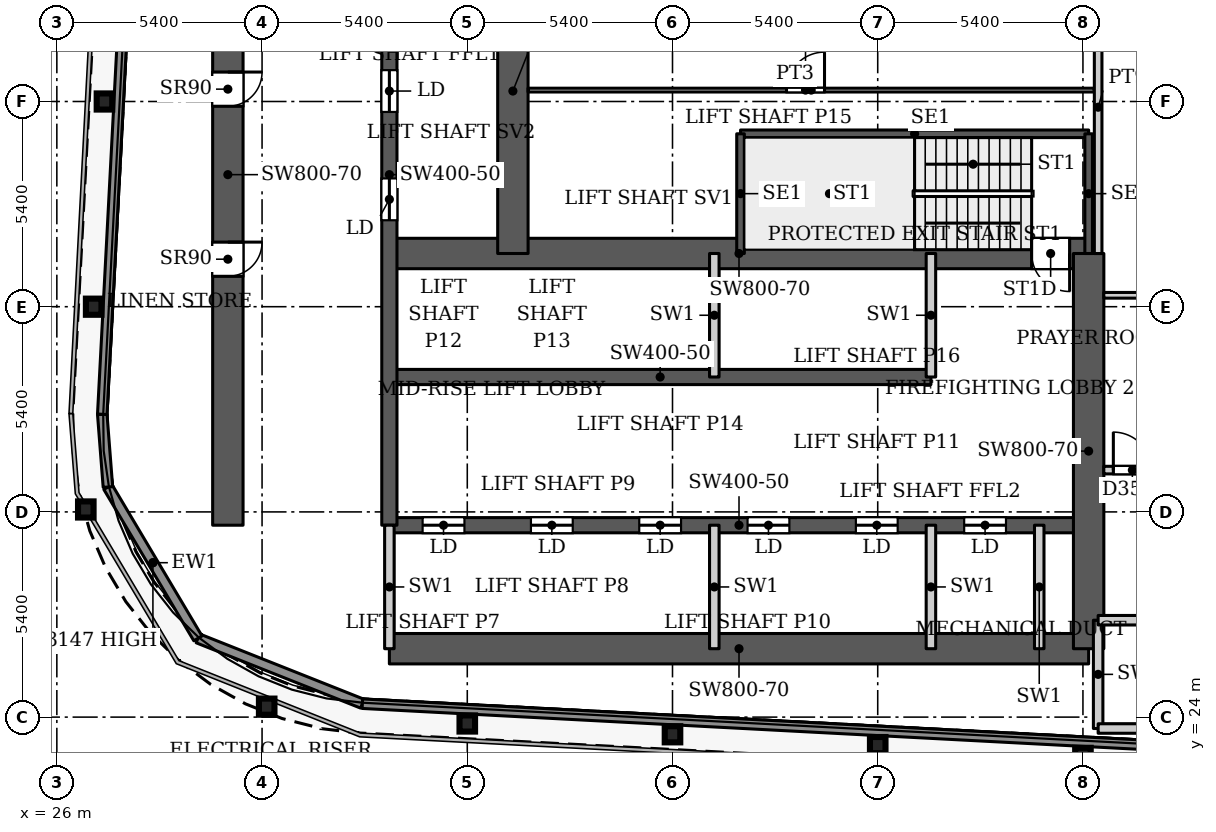
"""IFC4 building model, lengths in metres.
Left out: names, types, materials, properties, quantities, classifications, styles, units other than length and angle.
Written with IfcOpenShell. Run it as: python <this file> out.ifc"""

import sys

from ifc_helpers import new_model, si_unit, direction, frame, frame_2d, origin, origin_2d, place, context, subcontext, project, spatial, rectangle, i_section, extrude, source, transform, mapped, element, fill, save


model = new_model("IFC4")
c1 = context("Model", 3, precision=1e-05, world=origin(), true_north=direction((0.0, 1.0)))
c2 = subcontext(c1, "Body", "Model", "MODEL_VIEW")
j1 = project(units=[si_unit("LENGTHUNIT", "METRE"), si_unit("PLANEANGLEUNIT", "RADIAN")], contexts=[c1])
p1 = place(None, origin())
s1 = spatial("IfcSite", under=j1, at=p1, CompositionType="ELEMENT")
p2 = place(p1, origin())
s2 = spatial("IfcBuilding", under=s1, at=p2, CompositionType="ELEMENT")
p3 = place(p2, frame((0.0, 0.0, 152.6)))
s3 = spatial("IfcBuildingStorey", under=s2, at=p3, CompositionType="ELEMENT", Elevation=152.6)
for number, where, z_axis, x_axis in (
    (1, (53.0, 22.98, 0.0), (0.0, 0.0, 1.0), (1.0, 0.0, 0.0)),
    (2, (47.6, 23.264, 0.0), (0.0, 0.0, 1.0), (1.0, 0.0, 0.0)),
    (3, (42.2, 23.548, 0.0), (0.0, 0.0, 1.0), (1.0, 0.0, 0.0)),
    (4, (36.8, 23.832, 0.0), (0.0, 0.0, 1.0), (1.0, 0.0, 0.0)),
    (5, (31.522, 24.275, 0.0), (0.0, 0.0, 1.0), (1.0, 0.0, 0.0)),
    (6, (26.762, 29.464, 0.0), (0.0, 0.0, 1.0), (1.0, 0.0, 0.0)),
    (7, (26.969, 34.8, 0.0), (0.0, 0.0, 1.0), (1.0, 0.0, 0.0)),
    (8, (27.253, 40.2, 0.0), (0.0, 0.0, 1.0), (1.0, 0.0, 0.0)),
):
    element("IfcColumn", number, at=place(p3, frame(where, z_axis=z_axis, x_axis=x_axis)), inside=s3, PredefinedType="COLUMN", context=c2, shape_type="SweptSolid", body=[
        extrude(i_section(OverallWidth=0.409, OverallDepth=0.425, WebThickness=0.033, FlangeThickness=0.052, FilletRadius=0.013, at=origin_2d()), origin(), (0.0, 0.0, 1.0), 3.9),
    ])
p4 = place(p3, frame((34.75, 25.8, 0.0), z_axis=(0.0, 0.0, 1.0), x_axis=(1.0, 0.0, 0.0)))
e9 = element("IfcWall", 9, at=p4, inside=s3, PredefinedType="SHEAR", context=c2, shape_type="SweptSolid", body=[
    extrude(rectangle(XDim=18.4, YDim=0.8, at=frame_2d((9.2, 0.0))), origin(), (0.0, 0.0, 1.0), 3.9),
])
p5 = place(p3, frame((34.75, 29.05, 0.0), z_axis=(0.0, 0.0, 1.0), x_axis=(1.0, 0.0, 0.0)))
e10 = element("IfcWall", 10, at=p5, inside=s3, PredefinedType="SHEAR", context=c2, shape_type="SweptSolid", body=[
    extrude(rectangle(XDim=18.4, YDim=0.4, at=frame_2d((9.2, 0.0))), origin(), (0.0, 0.0, 1.0), 3.9),
])
p6 = place(p5, frame((0.875, 0.0, 0.0)))
e11 = element("IfcOpeningElement", 11, at=p6, cuts=e10, PredefinedType="OPENING", context=c2, shape_type="SweptSolid", body=[
    extrude(rectangle(XDim=1.1, YDim=2.2, at=frame_2d((0.55, 1.1))), frame((0.0, 0.21, 0.0), z_axis=(0.0, -1.0, 0.0), x_axis=(1.0, 0.0, 0.0)), (0.0, 0.0, 1.0), 0.42),
])
p7 = place(p5, frame((3.725, 0.0, 0.0)))
e12 = element("IfcOpeningElement", 12, at=p7, cuts=e10, PredefinedType="OPENING", context=c2, shape_type="SweptSolid", body=[
    extrude(rectangle(XDim=1.1, YDim=2.2, at=frame_2d((0.55, 1.1))), frame((0.0, 0.21, 0.0), z_axis=(0.0, -1.0, 0.0), x_axis=(1.0, 0.0, 0.0)), (0.0, 0.0, 1.0), 0.42),
])
p8 = place(p5, frame((6.575, 0.0, 0.0)))
e13 = element("IfcOpeningElement", 13, at=p8, cuts=e10, PredefinedType="OPENING", context=c2, shape_type="SweptSolid", body=[
    extrude(rectangle(XDim=1.1, YDim=2.2, at=frame_2d((0.55, 1.1))), frame((0.0, 0.21, 0.0), z_axis=(0.0, -1.0, 0.0), x_axis=(1.0, 0.0, 0.0)), (0.0, 0.0, 1.0), 0.42),
])
p9 = place(p5, frame((9.425, 0.0, 0.0)))
e14 = element("IfcOpeningElement", 14, at=p9, cuts=e10, PredefinedType="OPENING", context=c2, shape_type="SweptSolid", body=[
    extrude(rectangle(XDim=1.1, YDim=2.2, at=frame_2d((0.55, 1.1))), frame((0.0, 0.21, 0.0), z_axis=(0.0, -1.0, 0.0), x_axis=(1.0, 0.0, 0.0)), (0.0, 0.0, 1.0), 0.42),
])
p10 = place(p5, frame((12.275, 0.0, 0.0)))
e15 = element("IfcOpeningElement", 15, at=p10, cuts=e10, PredefinedType="OPENING", context=c2, shape_type="SweptSolid", body=[
    extrude(rectangle(XDim=1.1, YDim=2.2, at=frame_2d((0.55, 1.1))), frame((0.0, 0.21, 0.0), z_axis=(0.0, -1.0, 0.0), x_axis=(1.0, 0.0, 0.0)), (0.0, 0.0, 1.0), 0.42),
])
p11 = place(p5, frame((15.125, 0.0, 0.0)))
e16 = element("IfcOpeningElement", 16, at=p11, cuts=e10, PredefinedType="OPENING", context=c2, shape_type="SweptSolid", body=[
    extrude(rectangle(XDim=1.1, YDim=2.2, at=frame_2d((0.55, 1.1))), frame((0.0, 0.21, 0.0), z_axis=(0.0, -1.0, 0.0), x_axis=(1.0, 0.0, 0.0)), (0.0, 0.0, 1.0), 0.42),
])
p12 = place(p3, frame((34.75, 32.95, 0.0), z_axis=(0.0, 0.0, 1.0), x_axis=(1.0, 0.0, 0.0)))
e17 = element("IfcWall", 17, at=p12, inside=s3, PredefinedType="SHEAR", context=c2, shape_type="SweptSolid", body=[
    extrude(rectangle(XDim=14.25, YDim=0.4, at=frame_2d((7.125, 0.0))), origin(), (0.0, 0.0, 1.0), 3.9),
])
p13 = place(p3, frame((34.75, 36.2, 0.0), z_axis=(0.0, 0.0, 1.0), x_axis=(1.0, 0.0, 0.0)))
e18 = element("IfcWall", 18, at=p13, inside=s3, PredefinedType="SHEAR", context=c2, shape_type="SweptSolid", body=[
    extrude(rectangle(XDim=18.4, YDim=0.8, at=frame_2d((9.2, 0.0))), origin(), (0.0, 0.0, 1.0), 3.9),
])
p14 = place(p13, frame((16.9, 0.0, 0.0)))
e19 = element("IfcOpeningElement", 19, at=p14, cuts=e18, PredefinedType="OPENING", context=c2, shape_type="SweptSolid", body=[
    extrude(rectangle(XDim=1.0, YDim=2.2, at=frame_2d((0.5, 1.1))), frame((0.0, 0.41, 0.0), z_axis=(0.0, -1.0, 0.0), x_axis=(1.0, 0.0, 0.0)), (0.0, 0.0, 1.0), 0.82),
])
p15 = place(p3, frame((34.75, 29.05, 0.0), z_axis=(0.0, 0.0, 1.0), x_axis=(0.0, 1.0, 0.0)))
e20 = element("IfcWall", 20, at=p15, inside=s3, PredefinedType="SHEAR", context=c2, shape_type="SweptSolid", body=[
    extrude(rectangle(XDim=18.45, YDim=0.4, at=frame_2d((9.225, 0.0))), origin(), (0.0, 0.0, 1.0), 3.9),
])
p16 = place(p15, frame((8.025, 0.0, 0.0)))
e21 = element("IfcOpeningElement", 21, at=p16, cuts=e20, PredefinedType="OPENING", context=c2, shape_type="SweptSolid", body=[
    extrude(rectangle(XDim=1.1, YDim=2.2, at=frame_2d((0.55, 1.1))), frame((0.0, 0.21, 0.0), z_axis=(0.0, -1.0, 0.0), x_axis=(1.0, 0.0, 0.0)), (0.0, 0.0, 1.0), 0.42),
])
p17 = place(p15, frame((10.875, 0.0, 0.0)))
e22 = element("IfcOpeningElement", 22, at=p17, cuts=e20, PredefinedType="OPENING", context=c2, shape_type="SweptSolid", body=[
    extrude(rectangle(XDim=1.1, YDim=2.2, at=frame_2d((0.55, 1.1))), frame((0.0, 0.21, 0.0), z_axis=(0.0, -1.0, 0.0), x_axis=(1.0, 0.0, 0.0)), (0.0, 0.0, 1.0), 0.42),
])
p18 = place(p15, frame((13.725, 0.0, 0.0)))
e23 = element("IfcOpeningElement", 23, at=p18, cuts=e20, PredefinedType="OPENING", context=c2, shape_type="SweptSolid", body=[
    extrude(rectangle(XDim=1.1, YDim=2.2, at=frame_2d((0.55, 1.1))), frame((0.0, 0.21, 0.0), z_axis=(0.0, -1.0, 0.0), x_axis=(1.0, 0.0, 0.0)), (0.0, 0.0, 1.0), 0.42),
])
p19 = place(p15, frame((15.95, 0.0, 0.0)))
e24 = element("IfcOpeningElement", 24, at=p19, cuts=e20, PredefinedType="OPENING", context=c2, shape_type="SweptSolid", body=[
    extrude(rectangle(XDim=1.1, YDim=2.2, at=frame_2d((0.55, 1.1))), frame((0.0, 0.21, 0.0), z_axis=(0.0, -1.0, 0.0), x_axis=(1.0, 0.0, 0.0)), (0.0, 0.0, 1.0), 0.42),
])
p20 = place(p3, frame((38.0, 36.2, 0.0), z_axis=(0.0, 0.0, 1.0), x_axis=(0.0, 1.0, 0.0)))
e25 = element("IfcWall", 25, at=p20, inside=s3, PredefinedType="SHEAR", context=c2, shape_type="SweptSolid", body=[
    extrude(rectangle(XDim=8.55, YDim=0.8, at=frame_2d((4.275, 0.0))), origin(), (0.0, 0.0, 1.0), 3.9),
])
p21 = place(p3, frame((30.5, 29.05, 0.0), z_axis=(0.0, 0.0, 1.0), x_axis=(0.0, 1.0, 0.0)))
e26 = element("IfcWall", 26, at=p21, inside=s3, PredefinedType="SHEAR", context=c2, shape_type="SweptSolid", body=[
    extrude(rectangle(XDim=18.45, YDim=0.8, at=frame_2d((9.225, 0.0))), origin(), (0.0, 0.0, 1.0), 3.9),
])
p22 = place(p21, frame((6.55, 0.0, 0.0)))
e27 = element("IfcOpeningElement", 27, at=p22, cuts=e26, PredefinedType="OPENING", context=c2, shape_type="SweptSolid", body=[
    extrude(rectangle(XDim=0.9, YDim=2.2, at=frame_2d((0.45, 1.1))), frame((0.0, 0.41, 0.0), z_axis=(0.0, -1.0, 0.0), x_axis=(1.0, 0.0, 0.0)), (0.0, 0.0, 1.0), 0.82),
])
p23 = place(p21, frame((11.025, 0.0, 0.0)))
e28 = element("IfcOpeningElement", 28, at=p23, cuts=e26, PredefinedType="OPENING", context=c2, shape_type="SweptSolid", body=[
    extrude(rectangle(XDim=0.9, YDim=2.2, at=frame_2d((0.45, 1.1))), frame((0.0, 0.41, 0.0), z_axis=(0.0, -1.0, 0.0), x_axis=(1.0, 0.0, 0.0)), (0.0, 0.0, 1.0), 0.82),
])
p24 = place(p3, frame((53.15, 25.8, 0.0), z_axis=(0.0, 0.0, 1.0), x_axis=(0.0, 1.0, 0.0)))
e29 = element("IfcWall", 29, at=p24, inside=s3, PredefinedType="SHEAR", context=c2, shape_type="SweptSolid", body=[
    extrude(rectangle(XDim=10.4, YDim=0.8, at=frame_2d((5.2, 0.0))), origin(), (0.0, 0.0, 1.0), 3.9),
])
p25 = place(p3, frame((34.039, 24.353, 0.0), z_axis=(0.0, 0.0, 1.0), x_axis=(-0.929352825399, 0.369192803184, 0.0)))
e30 = element("IfcWall", 30, at=p25, inside=s3, PredefinedType="SOLIDWALL", context=c2, shape_type="SweptSolid", body=[
    extrude(rectangle(XDim=4.656, YDim=0.25, at=frame_2d((2.328, 0.0))), origin(), (0.0, 0.0, 1.0), 3.75),
])
p26 = place(p3, frame((29.712, 26.072, 0.0), z_axis=(0.0, 0.0, 1.0), x_axis=(-0.511028049012, 0.859564036662, 0.0)))
e31 = element("IfcWall", 31, at=p26, inside=s3, PredefinedType="SOLIDWALL", context=c2, shape_type="SweptSolid", body=[
    extrude(rectangle(XDim=4.634, YDim=0.25, at=frame_2d((2.317, 0.0))), origin(), (0.0, 0.0, 1.0), 3.147),
])
p27 = place(p3, frame((27.344, 30.055, 0.0), z_axis=(0.0, 0.0, 1.0), x_axis=(-0.077571675317, 0.99698677784, 0.0)))
e32 = element("IfcWall", 32, at=p27, inside=s3, PredefinedType="SOLIDWALL", context=c2, shape_type="SweptSolid", body=[
    extrude(rectangle(XDim=1.92, YDim=0.25, at=frame_2d((0.96, 0.0))), origin(), (0.0, 0.0, 1.0), 3.75),
])
p28 = place(p3, frame((27.195, 31.969, 0.0), z_axis=(0.0, 0.0, 1.0), x_axis=(0.052554995867, 0.998618031286, 0.0)))
e33 = element("IfcWall", 33, at=p28, inside=s3, PredefinedType="SOLIDWALL", context=c2, shape_type="SweptSolid", body=[
    extrude(rectangle(XDim=66.787, YDim=0.25, at=frame_2d((33.394, 0.0))), origin(), (0.0, 0.0, 1.0), 3.75),
])
p29 = place(p3, frame((89.786, 21.419, 0.0), z_axis=(0.0, 0.0, 1.0), x_axis=(-0.998617793089, 0.052559521752, 0.0)))
e34 = element("IfcWall", 34, at=p29, inside=s3, PredefinedType="SOLIDWALL", context=c2, shape_type="SweptSolid", body=[
    extrude(rectangle(XDim=55.824, YDim=0.25, at=frame_2d((27.912, 0.0))), origin(), (0.0, 0.0, 1.0), 3.75),
])
p30 = place(p3, frame((43.99, 39.35, 0.0), z_axis=(0.0, 0.0, 1.0), x_axis=(1.0, 0.0, 0.0)))
e35 = element("IfcWall", 35, at=p30, inside=s3, PredefinedType="SHEAR", context=c2, shape_type="SweptSolid", body=[
    extrude(rectangle(XDim=9.16, YDim=0.2, at=frame_2d((4.58, 0.0))), origin(), (0.0, 0.0, 1.0), 3.9),
])
for number, where, z_axis, x_axis in (
    (36, (43.99, 36.2, 0.0), (0.0, 0.0, 1.0), (0.0, 1.0, 0.0)),
    (37, (53.15, 36.2, 0.0), (0.0, 0.0, 1.0), (0.0, 1.0, 0.0)),
):
    element("IfcWall", number, at=place(p3, frame(where, z_axis=z_axis, x_axis=x_axis)), inside=s3, PredefinedType="SHEAR", context=c2, shape_type="SweptSolid", body=[
        extrude(rectangle(XDim=3.15, YDim=0.2, at=frame_2d((1.575, 0.0))), origin(), (0.0, 0.0, 1.0), 3.9),
    ])
for number, where, z_axis, x_axis in (
    (38, (34.75, 25.8, 0.0), (0.0, 0.0, 1.0), (0.0, 1.0, 0.0)),
    (39, (43.3, 25.8, 0.0), (0.0, 0.0, 1.0), (0.0, 1.0, 0.0)),
    (40, (43.3, 32.95, 0.0), (0.0, 0.0, 1.0), (0.0, 1.0, 0.0)),
    (41, (49.0, 25.8, 0.0), (0.0, 0.0, 1.0), (0.0, 1.0, 0.0)),
    (42, (49.0, 32.95, 0.0), (0.0, 0.0, 1.0), (0.0, 1.0, 0.0)),
    (43, (51.85, 25.8, 0.0), (0.0, 0.0, 1.0), (0.0, 1.0, 0.0)),
):
    element("IfcWall", number, at=place(p3, frame(where, z_axis=z_axis, x_axis=x_axis)), inside=s3, PredefinedType="PARTITIONING", context=c2, shape_type="SweptSolid", body=[
        extrude(rectangle(XDim=3.25, YDim=0.25, at=frame_2d((1.625, 0.0))), origin(), (0.0, 0.0, 1.0), 3.9),
    ])
p31 = place(p3, frame((53.4, 23.7, 0.0), z_axis=(0.0, 0.0, 1.0), x_axis=(0.0, 1.0, 0.0)))
e44 = element("IfcWall", 44, at=p31, inside=s3, PredefinedType="PARTITIONING", context=c2, shape_type="SweptSolid", body=[
    extrude(rectangle(XDim=2.85, YDim=0.25, at=frame_2d((1.425, 0.0))), origin(), (0.0, 0.0, 1.0), 3.9),
])
for number, where, z_axis, x_axis in (
    (45, (53.4, 23.7, 0.0), (0.0, 0.0, 1.0), (1.0, 0.0, 0.0)),
    (46, (53.4, 26.55, 0.0), (0.0, 0.0, 1.0), (1.0, 0.0, 0.0)),
):
    element("IfcWall", number, at=place(p3, frame(where, z_axis=z_axis, x_axis=x_axis)), inside=s3, PredefinedType="PARTITIONING", context=c2, shape_type="SweptSolid", body=[
        extrude(rectangle(XDim=17.1, YDim=0.25, at=frame_2d((8.55, 0.0))), origin(), (0.0, 0.0, 1.0), 3.9),
    ])
p32 = place(p3, frame((38.399, 40.5, 0.0), z_axis=(0.0, 0.0, 1.0), x_axis=(1.0, 0.0, 0.0)))
e47 = element("IfcWall", 47, at=p32, inside=s3, PredefinedType="PARTITIONING", context=c2, shape_type="SweptSolid", body=[
    extrude(rectangle(XDim=14.901, YDim=0.1, at=frame_2d((7.451, 0.0))), origin(), (0.0, 0.0, 1.0), 3.6),
])
p33 = place(p32, frame((6.801, 0.0, 0.0)))
e48 = element("IfcOpeningElement", 48, at=p33, cuts=e47, PredefinedType="OPENING", context=c2, shape_type="SweptSolid", body=[
    extrude(rectangle(XDim=1.0, YDim=2.1, at=frame_2d((0.5, 1.05))), frame((0.0, 0.06, 0.0), z_axis=(0.0, -1.0, 0.0), x_axis=(1.0, 0.0, 0.0)), (0.0, 0.0, 1.0), 0.12),
])
p34 = place(p3, frame((53.4, 36.199, 0.0), z_axis=(0.0, 0.0, 1.0), x_axis=(0.0, 1.0, 0.0)))
e49 = element("IfcWall", 49, at=p34, inside=s3, PredefinedType="PARTITIONING", context=c2, shape_type="SweptSolid", body=[
    extrude(rectangle(XDim=7.701, YDim=0.2, at=frame_2d((3.851, 0.0))), origin(), (0.0, 0.0, 1.0), 3.6),
])
p35 = place(p3, frame((53.549, 30.5, 0.0), z_axis=(0.0, 0.0, 1.0), x_axis=(1.0, 0.0, 0.0)))
e50 = element("IfcWall", 50, at=p35, inside=s3, PredefinedType="PARTITIONING", context=c2, shape_type="SweptSolid", body=[
    extrude(rectangle(XDim=35.551, YDim=0.2, at=frame_2d((17.775, 0.0))), origin(), (0.0, 0.0, 1.0), 3.6),
])
p36 = place(p35, frame((0.251, 0.0, 0.0)))
e51 = element("IfcOpeningElement", 51, at=p36, cuts=e50, PredefinedType="OPENING", context=c2, shape_type="SweptSolid", body=[
    extrude(rectangle(XDim=1.0, YDim=2.1, at=frame_2d((0.5, 1.05))), frame((0.0, 0.11, 0.0), z_axis=(0.0, -1.0, 0.0), x_axis=(1.0, 0.0, 0.0)), (0.0, 0.0, 1.0), 0.22),
])
p37 = place(p35, frame((21.701, 0.0, 0.0)))
e52 = element("IfcOpeningElement", 52, at=p37, cuts=e50, PredefinedType="OPENING", context=c2, shape_type="SweptSolid", body=[
    extrude(rectangle(XDim=1.0, YDim=2.1, at=frame_2d((0.5, 1.05))), frame((0.0, 0.11, 0.0), z_axis=(0.0, -1.0, 0.0), x_axis=(1.0, 0.0, 0.0)), (0.0, 0.0, 1.0), 0.22),
])
p38 = place(p35, frame((32.201, 0.0, 0.0)))
e53 = element("IfcOpeningElement", 53, at=p38, cuts=e50, PredefinedType="OPENING", context=c2, shape_type="SweptSolid", body=[
    extrude(rectangle(XDim=1.0, YDim=2.1, at=frame_2d((0.5, 1.05))), frame((0.0, 0.11, 0.0), z_axis=(0.0, -1.0, 0.0), x_axis=(1.0, 0.0, 0.0)), (0.0, 0.0, 1.0), 0.22),
])
p39 = place(p3, frame((53.549, 35.1, 0.0), z_axis=(0.0, 0.0, 1.0), x_axis=(1.0, 0.0, 0.0)))
e54 = element("IfcWall", 54, at=p39, inside=s3, PredefinedType="PARTITIONING", context=c2, shape_type="SweptSolid", body=[
    extrude(rectangle(XDim=9.051, YDim=0.15, at=frame_2d((4.525, 0.0))), origin(), (0.0, 0.0, 1.0), 3.6),
])
p40 = place(p39, frame((6.751, 0.0, 0.0)))
e55 = element("IfcOpeningElement", 55, at=p40, cuts=e54, PredefinedType="OPENING", context=c2, shape_type="SweptSolid", body=[
    extrude(rectangle(XDim=0.9, YDim=2.1, at=frame_2d((0.45, 1.05))), frame((0.0, 0.085, 0.0), z_axis=(0.0, -1.0, 0.0), x_axis=(1.0, 0.0, 0.0)), (0.0, 0.0, 1.0), 0.17),
])
p41 = place(p39, frame((2.051, 0.0, 0.0)))
e56 = element("IfcOpeningElement", 56, at=p41, cuts=e54, PredefinedType="OPENING", context=c2, shape_type="SweptSolid", body=[
    extrude(rectangle(XDim=1.0, YDim=2.1, at=frame_2d((0.5, 1.05))), frame((0.0, 0.085, 0.0), z_axis=(0.0, -1.0, 0.0), x_axis=(1.0, 0.0, 0.0)), (0.0, 0.0, 1.0), 0.17),
])
m1 = source(origin(), c2, "Body", "SweptSolid", [
    extrude(rectangle(XDim=1.1, YDim=2.2, at=frame_2d((0.55, 1.1))), frame((0.0, 0.025, 0.0), z_axis=(0.0, -1.0, 0.0), x_axis=(1.0, 0.0, 0.0)), (0.0, 0.0, 1.0), 0.05),
])
p42 = place(p6, origin())
e57 = element("IfcDoor", 57, at=p42, inside=s3, OperationType="SLIDING_TO_LEFT", PredefinedType="DOOR", context=c2, shape_type="MappedRepresentation", body=[
    mapped(m1, transform((0.0, 0.0, 0.0), x_axis=(1.0, 0.0, 0.0), y_axis=(0.0, 1.0, 0.0), z_axis=(0.0, 0.0, 1.0), scale=1.0)),
])
fill(e11, e57)
p43 = place(p7, origin())
e58 = element("IfcDoor", 58, at=p43, inside=s3, OperationType="SLIDING_TO_LEFT", PredefinedType="DOOR", context=c2, shape_type="MappedRepresentation", body=[
    mapped(m1, transform((0.0, 0.0, 0.0), x_axis=(1.0, 0.0, 0.0), y_axis=(0.0, 1.0, 0.0), z_axis=(0.0, 0.0, 1.0), scale=1.0)),
])
fill(e12, e58)
p44 = place(p8, origin())
e59 = element("IfcDoor", 59, at=p44, inside=s3, OperationType="SLIDING_TO_LEFT", PredefinedType="DOOR", context=c2, shape_type="MappedRepresentation", body=[
    mapped(m1, transform((0.0, 0.0, 0.0), x_axis=(1.0, 0.0, 0.0), y_axis=(0.0, 1.0, 0.0), z_axis=(0.0, 0.0, 1.0), scale=1.0)),
])
fill(e13, e59)
p45 = place(p9, origin())
e60 = element("IfcDoor", 60, at=p45, inside=s3, OperationType="SLIDING_TO_LEFT", PredefinedType="DOOR", context=c2, shape_type="MappedRepresentation", body=[
    mapped(m1, transform((0.0, 0.0, 0.0), x_axis=(1.0, 0.0, 0.0), y_axis=(0.0, 1.0, 0.0), z_axis=(0.0, 0.0, 1.0), scale=1.0)),
])
fill(e14, e60)
p46 = place(p10, origin())
e61 = element("IfcDoor", 61, at=p46, inside=s3, OperationType="SLIDING_TO_LEFT", PredefinedType="DOOR", context=c2, shape_type="MappedRepresentation", body=[
    mapped(m1, transform((0.0, 0.0, 0.0), x_axis=(1.0, 0.0, 0.0), y_axis=(0.0, 1.0, 0.0), z_axis=(0.0, 0.0, 1.0), scale=1.0)),
])
fill(e15, e61)
p47 = place(p16, origin())
e62 = element("IfcDoor", 62, at=p47, inside=s3, OperationType="SLIDING_TO_LEFT", PredefinedType="DOOR", context=c2, shape_type="MappedRepresentation", body=[
    mapped(m1, transform((0.0, 0.0, 0.0), x_axis=(1.0, 0.0, 0.0), y_axis=(0.0, 1.0, 0.0), z_axis=(0.0, 0.0, 1.0), scale=1.0)),
])
fill(e21, e62)
p48 = place(p17, origin())
e63 = element("IfcDoor", 63, at=p48, inside=s3, OperationType="SLIDING_TO_LEFT", PredefinedType="DOOR", context=c2, shape_type="MappedRepresentation", body=[
    mapped(m1, transform((0.0, 0.0, 0.0), x_axis=(1.0, 0.0, 0.0), y_axis=(0.0, 1.0, 0.0), z_axis=(0.0, 0.0, 1.0), scale=1.0)),
])
fill(e22, e63)
p49 = place(p11, origin())
e64 = element("IfcDoor", 64, at=p49, inside=s3, OperationType="SLIDING_TO_LEFT", PredefinedType="DOOR", context=c2, shape_type="MappedRepresentation", body=[
    mapped(m1, transform((0.0, 0.0, 0.0), x_axis=(1.0, 0.0, 0.0), y_axis=(0.0, 1.0, 0.0), z_axis=(0.0, 0.0, 1.0), scale=1.0)),
])
fill(e16, e64)
m2 = source(origin(), c2, "Body", "SweptSolid", [
    extrude(rectangle(XDim=0.9, YDim=2.2, at=frame_2d((0.45, 1.1))), frame((0.0, 0.025, 0.0), z_axis=(0.0, -1.0, 0.0), x_axis=(1.0, 0.0, 0.0)), (0.0, 0.0, 1.0), 0.05),
])
p50 = place(p22, origin())
e65 = element("IfcDoor", 65, at=p50, inside=s3, OperationType="SINGLE_SWING_RIGHT", PredefinedType="DOOR", context=c2, shape_type="MappedRepresentation", body=[
    mapped(m2, transform((0.0, 0.0, 0.0), x_axis=(1.0, 0.0, 0.0), y_axis=(0.0, 1.0, 0.0), z_axis=(0.0, 0.0, 1.0), scale=1.0)),
])
fill(e27, e65)
p51 = place(p23, origin())
e66 = element("IfcDoor", 66, at=p51, inside=s3, OperationType="SINGLE_SWING_RIGHT", PredefinedType="DOOR", context=c2, shape_type="MappedRepresentation", body=[
    mapped(m2, transform((0.0, 0.0, 0.0), x_axis=(1.0, 0.0, 0.0), y_axis=(0.0, 1.0, 0.0), z_axis=(0.0, 0.0, 1.0), scale=1.0)),
])
fill(e28, e66)
m3 = source(origin(), c2, "Body", "SweptSolid", [
    extrude(rectangle(XDim=1.0, YDim=2.2, at=frame_2d((0.5, 1.1))), frame((0.0, 0.025, 0.0), z_axis=(0.0, -1.0, 0.0), x_axis=(1.0, 0.0, 0.0)), (0.0, 0.0, 1.0), 0.05),
])
p52 = place(p14, origin())
e67 = element("IfcDoor", 67, at=p52, inside=s3, OperationType="SINGLE_SWING_RIGHT", PredefinedType="DOOR", context=c2, shape_type="MappedRepresentation", body=[
    mapped(m3, transform((0.0, 0.0, 0.0), x_axis=(1.0, 0.0, 0.0), y_axis=(0.0, 1.0, 0.0), z_axis=(0.0, 0.0, 1.0), scale=1.0)),
])
fill(e19, e67)
m4 = source(origin(), c2, "Body", "SweptSolid", [
    extrude(rectangle(XDim=1.0, YDim=2.1, at=frame_2d((0.5, 1.05))), frame((0.0, 0.025, 0.0), z_axis=(0.0, -1.0, 0.0), x_axis=(1.0, 0.0, 0.0)), (0.0, 0.0, 1.0), 0.05),
])
p53 = place(p36, origin())
e68 = element("IfcDoor", 68, at=p53, inside=s3, OperationType="SINGLE_SWING_LEFT", PredefinedType="DOOR", context=c2, shape_type="MappedRepresentation", body=[
    mapped(m4, transform((0.0, 0.0, 0.0), x_axis=(1.0, 0.0, 0.0), y_axis=(0.0, 1.0, 0.0), z_axis=(0.0, 0.0, 1.0), scale=1.0)),
])
fill(e51, e68)
m5 = source(origin(), c2, "Body", "SweptSolid", [
    extrude(rectangle(XDim=1.0, YDim=2.1, at=frame_2d((0.5, 1.05))), frame((0.0, 0.025, 0.0), z_axis=(0.0, -1.0, 0.0), x_axis=(1.0, 0.0, 0.0)), (0.0, 0.0, 1.0), 0.05),
])
p54 = place(p33, origin())
e69 = element("IfcDoor", 69, at=p54, inside=s3, OperationType="SINGLE_SWING_LEFT", PredefinedType="DOOR", context=c2, shape_type="MappedRepresentation", body=[
    mapped(m5, transform((0.0, 0.0, 0.0), x_axis=(1.0, 0.0, 0.0), y_axis=(0.0, 1.0, 0.0), z_axis=(0.0, 0.0, 1.0), scale=1.0)),
])
fill(e48, e69)
save(model, sys.argv[1])
